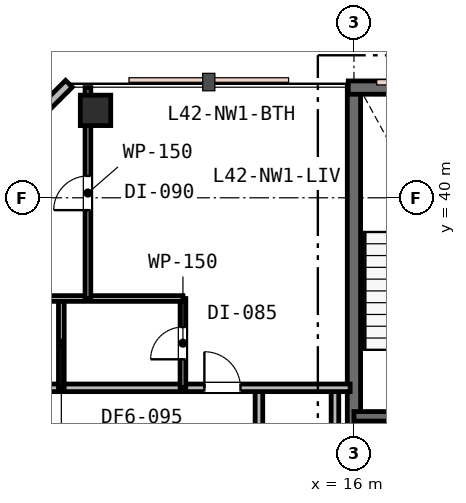
"""IFC4 building model, lengths in metres.
Left out: names, types, materials, properties, quantities, classifications, styles, units other than length and angle.
Written with IfcOpenShell. Run it as: python <this file> out.ifc"""

import sys

from ifc_helpers import new_model, si_unit, direction, frame, frame_2d, origin, origin_2d, place, context, subcontext, project, spatial, rectangle, extrude, element, fill, save


model = new_model("IFC4")
c1 = context("Model", 3, precision=1e-05, world=origin(), true_north=direction((0.0, 1.0)))
c2 = subcontext(c1, "Body", "Model", "MODEL_VIEW")
j1 = project(units=[si_unit("LENGTHUNIT", "METRE"), si_unit("PLANEANGLEUNIT", "RADIAN")], contexts=[c1])
p1 = place(None, origin())
s1 = spatial("IfcSite", under=j1, at=p1, CompositionType="ELEMENT")
p2 = place(p1, origin())
s2 = spatial("IfcBuilding", under=s1, at=p2, CompositionType="ELEMENT")
p3 = place(p2, frame((0.0, 0.0, 165.0)))
s3 = spatial("IfcBuildingStorey", under=s2, at=p3, CompositionType="ELEMENT", Elevation=165.0)
p4 = place(p3, frame((16.0, 30.65, 0.0), z_axis=(0.0, 0.0, 1.0), x_axis=(0.0, 1.0, 0.0)))
e1 = element("IfcWall", 1, at=p4, inside=s3, PredefinedType="SHEAR", context=c2, shape_type="SweptSolid", body=[
    extrude(rectangle(XDim=12.3, YDim=0.35, at=frame_2d((6.15, 0.0))), origin(), (0.0, 0.0, 1.0), 3.6),
])
p5 = place(p3, frame((15.85, 42.9, 0.0), z_axis=(0.0, 0.0, 1.0), x_axis=(1.0, 0.0, 0.0)))
e2 = element("IfcWall", 2, at=p5, inside=s3, PredefinedType="SHEAR", context=c2, shape_type="SweptSolid", body=[
    extrude(rectangle(XDim=24.3, YDim=0.35, at=frame_2d((12.15, 0.0))), origin(), (0.0, 0.0, 1.0), 3.6),
])
p6 = place(p3, frame((16.0, 34.25, 0.0), z_axis=(0.0, 0.0, 1.0), x_axis=(1.0, 0.0, 0.0)))
e3 = element("IfcWall", 3, at=p6, inside=s3, PredefinedType="SHEAR", context=c2, shape_type="SweptSolid", body=[
    extrude(rectangle(XDim=6.05, YDim=0.25, at=frame_2d((3.025, 0.0))), origin(), (0.0, 0.0, 1.0), 3.6),
])
p7 = place(p6, frame((1.25, 0.0, 0.0)))
e4 = element("IfcOpeningElement", 4, at=p7, cuts=e3, PredefinedType="OPENING", context=c2, shape_type="SweptSolid", body=[
    extrude(rectangle(XDim=1.0, YDim=2.15, at=frame_2d((0.5, 1.075))), frame((0.0, 0.135, 0.0), z_axis=(0.0, -1.0, 0.0), x_axis=(1.0, 0.0, 0.0)), (0.0, 0.0, 1.0), 0.27),
])
p8 = place(p6, frame((4.2, 0.0, 0.0)))
e5 = element("IfcOpeningElement", 5, at=p8, cuts=e3, PredefinedType="OPENING", context=c2, shape_type="SweptSolid", body=[
    extrude(rectangle(XDim=1.1, YDim=2.15, at=frame_2d((0.55, 1.075))), frame((0.0, 0.135, 0.0), z_axis=(0.0, -1.0, 0.0), x_axis=(1.0, 0.0, 0.0)), (0.0, 0.0, 1.0), 0.27),
])
p9 = place(p3, frame((9.2, 42.3, 0.0), z_axis=(0.0, 0.0, 1.0), x_axis=(1.0, 0.0, 0.0)))
e6 = element("IfcColumn", 6, at=p9, inside=s3, PredefinedType="COLUMN", context=c2, shape_type="SweptSolid", body=[
    extrude(rectangle(XDim=0.8, YDim=0.8, at=origin_2d()), origin(), (0.0, 0.0, 1.0), 3.6),
])
p10 = place(p3, frame((8.5, 43.0, 0.0), z_axis=(0.0, 0.0, 1.0), x_axis=(-0.707106781187, -0.707106781187, 0.0)))
e7 = element("IfcWall", 7, at=p10, inside=s3, PredefinedType="STANDARD", context=c2, shape_type="SweptSolid", body=[
    extrude(rectangle(XDim=4.95, YDim=0.25, at=frame_2d((2.475, 0.0))), origin(), (0.0, 0.0, 1.0), 3.33),
])
p11 = place(p10, frame((1.575, 0.0, 0.75)))
e8 = element("IfcOpeningElement", 8, at=p11, cuts=e7, PredefinedType="OPENING", context=c2, shape_type="SweptSolid", body=[
    extrude(rectangle(XDim=1.8, YDim=1.85, at=frame_2d((0.9, 0.925))), frame((0.0, 0.135, 0.0), z_axis=(0.0, -1.0, 0.0), x_axis=(1.0, 0.0, 0.0)), (0.0, 0.0, 1.0), 0.27),
])
p12 = place(p3, frame((15.5, 30.8, 0.0), z_axis=(0.0, 0.0, 1.0), x_axis=(0.0, 1.0, 0.0)))
e9 = element("IfcWall", 9, at=p12, inside=s3, PredefinedType="PARTITIONING", context=c2, shape_type="SweptSolid", body=[
    extrude(rectangle(XDim=4.2, YDim=0.2, at=frame_2d((2.1, 0.0))), origin(), (0.0, 0.0, 1.0), 2.93),
])
p13 = place(p3, frame((13.5, 17.0, 0.0), z_axis=(0.0, 0.0, 1.0), x_axis=(0.0, 1.0, 0.0)))
e10 = element("IfcWall", 10, at=p13, inside=s3, PredefinedType="PARTITIONING", context=c2, shape_type="SweptSolid", body=[
    extrude(rectangle(XDim=18.0, YDim=0.2, at=frame_2d((9.0, 0.0))), origin(), (0.0, 0.0, 1.0), 2.93),
])
p14 = place(p13, frame((15.425, 0.0, 0.0)))
e11 = element("IfcOpeningElement", 11, at=p14, cuts=e10, PredefinedType="OPENING", context=c2, shape_type="SweptSolid", body=[
    extrude(rectangle(XDim=0.95, YDim=2.15, at=frame_2d((0.475, 1.075))), frame((0.0, 0.11, 0.0), z_axis=(0.0, -1.0, 0.0), x_axis=(1.0, 0.0, 0.0)), (0.0, 0.0, 1.0), 0.22),
])
p15 = place(p13, frame((10.225, 0.0, 0.0)))
e12 = element("IfcOpeningElement", 12, at=p15, cuts=e10, PredefinedType="OPENING", context=c2, shape_type="SweptSolid", body=[
    extrude(rectangle(XDim=0.95, YDim=2.15, at=frame_2d((0.475, 1.075))), frame((0.0, 0.11, 0.0), z_axis=(0.0, -1.0, 0.0), x_axis=(1.0, 0.0, 0.0)), (0.0, 0.0, 1.0), 0.22),
])
p16 = place(p3, frame((5.1, 35.0, 0.0), z_axis=(0.0, 0.0, 1.0), x_axis=(1.0, 0.0, 0.0)))
e13 = element("IfcWall", 13, at=p16, inside=s3, PredefinedType="PARTITIONING", context=c2, shape_type="SweptSolid", body=[
    extrude(rectangle(XDim=10.8, YDim=0.2, at=frame_2d((5.4, 0.0))), origin(), (0.0, 0.0, 1.0), 3.01),
])
p17 = place(p16, frame((6.964, 0.0, 0.0)))
e14 = element("IfcOpeningElement", 14, at=p17, cuts=e13, PredefinedType="OPENING", context=c2, shape_type="SweptSolid", body=[
    extrude(rectangle(XDim=0.95, YDim=2.15, at=frame_2d((0.475, 1.075))), frame((0.0, 0.11, 0.0), z_axis=(0.0, -1.0, 0.0), x_axis=(1.0, 0.0, 0.0)), (0.0, 0.0, 1.0), 0.22),
])
p18 = place(p3, frame((11.5, 35.0, 0.0), z_axis=(0.0, 0.0, 1.0), x_axis=(0.0, 1.0, 0.0)))
e15 = element("IfcWall", 15, at=p18, inside=s3, PredefinedType="PARTITIONING", context=c2, shape_type="SweptSolid", body=[
    extrude(rectangle(XDim=2.35, YDim=0.15, at=frame_2d((1.175, 0.0))), origin(), (0.0, 0.0, 1.0), 3.33),
])
p19 = place(p18, frame((0.75, 0.0, 0.0)))
e16 = element("IfcOpeningElement", 16, at=p19, cuts=e15, PredefinedType="OPENING", context=c2, shape_type="SweptSolid", body=[
    extrude(rectangle(XDim=0.85, YDim=2.15, at=frame_2d((0.425, 1.075))), frame((0.0, 0.085, 0.0), z_axis=(0.0, -1.0, 0.0), x_axis=(1.0, 0.0, 0.0)), (0.0, 0.0, 1.0), 0.17),
])
p20 = place(p3, frame((8.3, 35.0, 0.0), z_axis=(0.0, 0.0, 1.0), x_axis=(0.0, 1.0, 0.0)))
e17 = element("IfcWall", 17, at=p20, inside=s3, PredefinedType="PARTITIONING", context=c2, shape_type="SweptSolid", body=[
    extrude(rectangle(XDim=2.35, YDim=0.15, at=frame_2d((1.175, 0.0))), origin(), (0.0, 0.0, 1.0), 3.33),
])
p21 = place(p3, frame((5.1, 37.35, 0.0), z_axis=(0.0, 0.0, 1.0), x_axis=(1.0, 0.0, 0.0)))
e18 = element("IfcWall", 18, at=p21, inside=s3, PredefinedType="PARTITIONING", context=c2, shape_type="SweptSolid", body=[
    extrude(rectangle(XDim=6.4, YDim=0.15, at=frame_2d((3.2, 0.0))), origin(), (0.0, 0.0, 1.0), 3.01),
])
p22 = place(p21, frame((1.78, 0.0, 0.0)))
e19 = element("IfcOpeningElement", 19, at=p22, cuts=e18, PredefinedType="OPENING", context=c2, shape_type="SweptSolid", body=[
    extrude(rectangle(XDim=0.85, YDim=2.15, at=frame_2d((0.425, 1.075))), frame((0.0, 0.085, 0.0), z_axis=(0.0, -1.0, 0.0), x_axis=(1.0, 0.0, 0.0)), (0.0, 0.0, 1.0), 0.17),
])
p23 = place(p3, frame((9.0, 37.35, 0.0), z_axis=(0.0, 0.0, 1.0), x_axis=(0.0, 1.0, 0.0)))
e20 = element("IfcWall", 20, at=p23, inside=s3, PredefinedType="PARTITIONING", context=c2, shape_type="SweptSolid", body=[
    extrude(rectangle(XDim=5.55, YDim=0.15, at=frame_2d((2.775, 0.0))), origin(), (0.0, 0.0, 1.0), 3.01),
])
p24 = place(p23, frame((2.325, 0.0, 0.0)))
e21 = element("IfcOpeningElement", 21, at=p24, cuts=e20, PredefinedType="OPENING", context=c2, shape_type="SweptSolid", body=[
    extrude(rectangle(XDim=0.9, YDim=2.15, at=frame_2d((0.45, 1.075))), frame((0.0, 0.085, 0.0), z_axis=(0.0, -1.0, 0.0), x_axis=(1.0, 0.0, 0.0)), (0.0, 0.0, 1.0), 0.17),
])
p25 = place(p17, origin())
e22 = element("IfcDoor", 22, at=p25, inside=s3, OperationType="SINGLE_SWING_LEFT", PredefinedType="DOOR", context=c2, shape_type="SweptSolid", body=[
    extrude(rectangle(XDim=0.95, YDim=2.15, at=frame_2d((0.475, 1.075))), frame((0.0, 0.025, 0.0), z_axis=(0.0, -1.0, 0.0), x_axis=(1.0, 0.0, 0.0)), (0.0, 0.0, 1.0), 0.05),
])
fill(e14, e22)
p26 = place(p19, origin())
e23 = element("IfcDoor", 23, at=p26, inside=s3, OperationType="SINGLE_SWING_LEFT", PredefinedType="DOOR", context=c2, shape_type="SweptSolid", body=[
    extrude(rectangle(XDim=0.85, YDim=2.15, at=frame_2d((0.425, 1.075))), frame((0.0, 0.025, 0.0), z_axis=(0.0, -1.0, 0.0), x_axis=(1.0, 0.0, 0.0)), (0.0, 0.0, 1.0), 0.05),
])
fill(e16, e23)
p27 = place(p24, origin())
e24 = element("IfcDoor", 24, at=p27, inside=s3, OperationType="SINGLE_SWING_LEFT", PredefinedType="DOOR", context=c2, shape_type="SweptSolid", body=[
    extrude(rectangle(XDim=0.9, YDim=2.15, at=frame_2d((0.45, 1.075))), frame((0.0, 0.025, 0.0), z_axis=(0.0, -1.0, 0.0), x_axis=(1.0, 0.0, 0.0)), (0.0, 0.0, 1.0), 0.05),
])
fill(e21, e24)
save(model, sys.argv[1])
